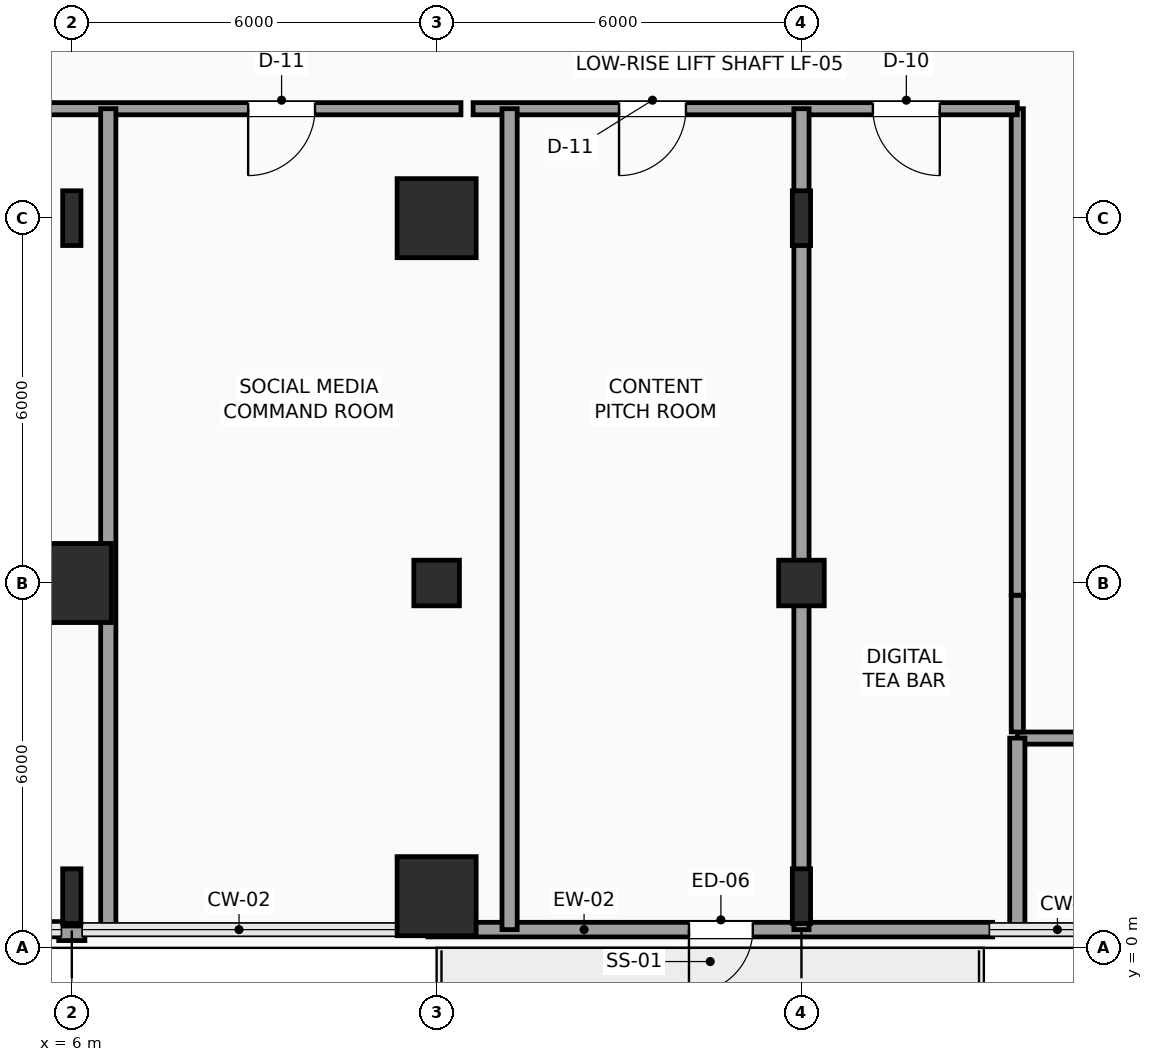
"""IFC4 building model, lengths in metres.
Left out: names, types, materials, properties, quantities, classifications, styles, units other than length and angle.
Written with IfcOpenShell. Run it as: python <this file> out.ifc"""

import sys

from ifc_helpers import new_model, si_unit, direction, frame, frame_2d, origin, origin_2d, place, context, subcontext, project, spatial, rectangle, hollow_rectangle, i_section, extrude, element, fill, save


model = new_model("IFC4")
c1 = context("Model", 3, precision=1e-05, world=origin(), true_north=direction((0.0, 1.0)))
c2 = subcontext(c1, "Body", "Model", "MODEL_VIEW")
j1 = project(units=[si_unit("LENGTHUNIT", "METRE"), si_unit("PLANEANGLEUNIT", "RADIAN")], contexts=[c1])
p1 = place(None, origin())
s1 = spatial("IfcSite", under=j1, at=p1, CompositionType="ELEMENT")
p2 = place(p1, origin())
s2 = spatial("IfcBuilding", under=s1, at=p2, CompositionType="ELEMENT")
p3 = place(p2, frame((0.0, 0.0, 79.2)))
s3 = spatial("IfcBuildingStorey", under=s2, at=p3, CompositionType="ELEMENT", Elevation=79.2)
p4 = place(p3, frame((6.0, 0.85, 0.0), z_axis=(0.0, 0.0, 1.0), x_axis=(1.0, 0.0, 0.0)))
e1 = element("IfcColumn", 1, at=p4, inside=s3, PredefinedType="COLUMN", context=c2, shape_type="SweptSolid", body=[
    extrude(i_section(OverallWidth=0.3, OverallDepth=0.9, WebThickness=0.019, FlangeThickness=0.035, FilletRadius=0.03, at=origin_2d()), origin(), (0.0, 0.0, 1.0), 3.9),
])
p5 = place(p3, frame((6.0, 6.0, 0.0), z_axis=(0.0, 0.0, 1.0), x_axis=(1.0, 0.0, 0.0)))
e2 = element("IfcColumn", 2, at=p5, inside=s3, PredefinedType="COLUMN", context=c2, shape_type="SweptSolid", body=[
    extrude(rectangle(XDim=1.3, YDim=1.3, at=origin_2d()), origin(), (0.0, 0.0, 1.0), 3.9),
])
p6 = place(p3, frame((6.0, 12.0, 0.0), z_axis=(0.0, 0.0, 1.0), x_axis=(1.0, 0.0, 0.0)))
e3 = element("IfcColumn", 3, at=p6, inside=s3, PredefinedType="COLUMN", context=c2, shape_type="SweptSolid", body=[
    extrude(i_section(OverallWidth=0.3, OverallDepth=0.9, WebThickness=0.019, FlangeThickness=0.035, FilletRadius=0.03, at=origin_2d()), origin(), (0.0, 0.0, 1.0), 3.9),
])
p7 = place(p3, frame((12.0, 0.85, 0.0), z_axis=(0.0, 0.0, 1.0), x_axis=(1.0, 0.0, 0.0)))
e4 = element("IfcColumn", 4, at=p7, inside=s3, PredefinedType="COLUMN", context=c2, shape_type="SweptSolid", body=[
    extrude(rectangle(XDim=1.3, YDim=1.3, at=origin_2d()), origin(), (0.0, 0.0, 1.0), 3.9),
])
p8 = place(p3, frame((12.0, 6.0, 0.0), z_axis=(0.0, 0.0, 1.0), x_axis=(1.0, 0.0, 0.0)))
e5 = element("IfcColumn", 5, at=p8, inside=s3, PredefinedType="COLUMN", context=c2, shape_type="SweptSolid", body=[
    extrude(hollow_rectangle(XDim=0.75, YDim=0.75, WallThickness=0.035, InnerFilletRadius=0.035, OuterFilletRadius=0.05, at=origin_2d()), origin(), (0.0, 0.0, 1.0), 3.9),
])
p9 = place(p3, frame((12.0, 12.0, 0.0), z_axis=(0.0, 0.0, 1.0), x_axis=(1.0, 0.0, 0.0)))
e6 = element("IfcColumn", 6, at=p9, inside=s3, PredefinedType="COLUMN", context=c2, shape_type="SweptSolid", body=[
    extrude(rectangle(XDim=1.3, YDim=1.3, at=origin_2d()), origin(), (0.0, 0.0, 1.0), 3.9),
])
p10 = place(p3, frame((18.0, 0.85, 0.0), z_axis=(0.0, 0.0, 1.0), x_axis=(1.0, 0.0, 0.0)))
e7 = element("IfcColumn", 7, at=p10, inside=s3, PredefinedType="COLUMN", context=c2, shape_type="SweptSolid", body=[
    extrude(i_section(OverallWidth=0.3, OverallDepth=0.9, WebThickness=0.019, FlangeThickness=0.035, FilletRadius=0.03, at=origin_2d()), origin(), (0.0, 0.0, 1.0), 3.9),
])
p11 = place(p3, frame((18.0, 6.0, 0.0), z_axis=(0.0, 0.0, 1.0), x_axis=(1.0, 0.0, 0.0)))
e8 = element("IfcColumn", 8, at=p11, inside=s3, PredefinedType="COLUMN", context=c2, shape_type="SweptSolid", body=[
    extrude(hollow_rectangle(XDim=0.75, YDim=0.75, WallThickness=0.035, InnerFilletRadius=0.035, OuterFilletRadius=0.05, at=origin_2d()), origin(), (0.0, 0.0, 1.0), 3.9),
])
p12 = place(p3, frame((18.0, 12.0, 0.0), z_axis=(0.0, 0.0, 1.0), x_axis=(1.0, 0.0, 0.0)))
e9 = element("IfcColumn", 9, at=p12, inside=s3, PredefinedType="COLUMN", context=c2, shape_type="SweptSolid", body=[
    extrude(i_section(OverallWidth=0.3, OverallDepth=0.9, WebThickness=0.019, FlangeThickness=0.035, FilletRadius=0.03, at=origin_2d()), origin(), (0.0, 0.0, 1.0), 3.9),
])
p13 = place(p3, frame((21.145, 0.3, 0.0), z_axis=(0.0, 0.0, 1.0), x_axis=(-1.0, 0.0, 0.0)))
e10 = element("IfcWall", 10, at=p13, inside=s3, PredefinedType="SOLIDWALL", context=c2, shape_type="SweptSolid", body=[
    extrude(rectangle(XDim=9.29, YDim=0.24, at=frame_2d((4.645, 0.0))), origin(), (0.0, 0.0, 1.0), 3.65),
])
p14 = place(p13, frame((3.945, 0.0, 0.0)))
e11 = element("IfcOpeningElement", 11, at=p14, cuts=e10, PredefinedType="OPENING", context=c2, shape_type="SweptSolid", body=[
    extrude(rectangle(XDim=1.05, YDim=2.2, at=frame_2d((0.525, 1.1))), frame((0.0, 0.13, 0.0), z_axis=(0.0, -1.0, 0.0), x_axis=(1.0, 0.0, 0.0)), (0.0, 0.0, 1.0), 0.26),
])
p15 = place(p3, frame((6.215, 0.24, 0.0), z_axis=(0.0, 0.0, 1.0), x_axis=(-1.0, 0.0, 0.0)))
e12 = element("IfcWall", 12, at=p15, inside=s3, PredefinedType="SOLIDWALL", context=c2, shape_type="SweptSolid", body=[
    extrude(rectangle(XDim=0.43, YDim=0.24, at=frame_2d((0.215, 0.0))), origin(), (0.0, 0.0, 1.0), 3.65),
])
p16 = place(p3, frame((36.15, 3.45, 0.0), z_axis=(0.0, 0.0, 1.0), x_axis=(-1.0, 0.0, 0.0)))
e13 = element("IfcWall", 13, at=p16, inside=s3, PredefinedType="PARTITIONING", context=c2, shape_type="SweptSolid", body=[
    extrude(rectangle(XDim=14.6, YDim=0.2, at=frame_2d((7.3, 0.0))), origin(), (0.0, 0.0, 1.0), 3.142),
])
p17 = place(p16, frame((11.275, 0.0, 0.0)))
e14 = element("IfcOpeningElement", 14, at=p17, cuts=e13, PredefinedType="OPENING", context=c2, shape_type="SweptSolid", body=[
    extrude(rectangle(XDim=1.1, YDim=2.25, at=frame_2d((0.55, 1.125))), frame((0.0, 0.11, 0.0), z_axis=(0.0, -1.0, 0.0), x_axis=(1.0, 0.0, 0.0)), (0.0, 0.0, 1.0), 0.22),
])
p18 = place(p16, frame((5.65, 0.0, 0.0)))
e15 = element("IfcOpeningElement", 15, at=p18, cuts=e13, PredefinedType="OPENING", context=c2, shape_type="SweptSolid", body=[
    extrude(rectangle(XDim=1.1, YDim=2.25, at=frame_2d((0.55, 1.125))), frame((0.0, 0.11, 0.0), z_axis=(0.0, -1.0, 0.0), x_axis=(1.0, 0.0, 0.0)), (0.0, 0.0, 1.0), 0.22),
])
p19 = place(p3, frame((21.55, 3.55, 0.0), z_axis=(0.0, 0.0, 1.0), x_axis=(0.0, 1.0, 0.0)))
e16 = element("IfcWall", 16, at=p19, inside=s3, PredefinedType="PARTITIONING", context=c2, shape_type="SweptSolid", body=[
    extrude(rectangle(XDim=2.25, YDim=0.2, at=frame_2d((1.125, 0.0))), origin(), (0.0, 0.0, 1.0), 3.65),
])
p20 = place(p3, frame((21.55, 5.8, 0.0), z_axis=(0.0, 0.0, 1.0), x_axis=(0.0, 1.0, 0.0)))
e17 = element("IfcWall", 17, at=p20, inside=s3, PredefinedType="PARTITIONING", context=c2, shape_type="SweptSolid", body=[
    extrude(rectangle(XDim=8.0, YDim=0.2, at=frame_2d((4.0, 0.0))), origin(), (0.0, 0.0, 1.0), 3.65),
])
p21 = place(p3, frame((21.55, 13.8, 0.0), z_axis=(0.0, 0.0, 1.0), x_axis=(-1.0, 0.0, 0.0)))
e18 = element("IfcWall", 18, at=p21, inside=s3, PredefinedType="PARTITIONING", context=c2, shape_type="SweptSolid", body=[
    extrude(rectangle(XDim=8.95, YDim=0.2, at=frame_2d((4.475, 0.0))), origin(), (0.0, 0.0, 1.0), 3.65),
])
p22 = place(p21, frame((5.45, 0.0, 0.0)))
e19 = element("IfcOpeningElement", 19, at=p22, cuts=e18, PredefinedType="OPENING", context=c2, shape_type="SweptSolid", body=[
    extrude(rectangle(XDim=1.1, YDim=2.25, at=frame_2d((0.55, 1.125))), frame((0.0, 0.11, 0.0), z_axis=(0.0, -1.0, 0.0), x_axis=(1.0, 0.0, 0.0)), (0.0, 0.0, 1.0), 0.22),
])
p23 = place(p21, frame((1.275, 0.0, 0.0)))
e20 = element("IfcOpeningElement", 20, at=p23, cuts=e18, PredefinedType="OPENING", context=c2, shape_type="SweptSolid", body=[
    extrude(rectangle(XDim=1.1, YDim=2.25, at=frame_2d((0.55, 1.125))), frame((0.0, 0.11, 0.0), z_axis=(0.0, -1.0, 0.0), x_axis=(1.0, 0.0, 0.0)), (0.0, 0.0, 1.0), 0.22),
])
p24 = place(p3, frame((12.4, 13.8, 0.0), z_axis=(0.0, 0.0, 1.0), x_axis=(-1.0, 0.0, 0.0)))
e21 = element("IfcWall", 21, at=p24, inside=s3, PredefinedType="PARTITIONING", context=c2, shape_type="SweptSolid", body=[
    extrude(rectangle(XDim=7.15, YDim=0.2, at=frame_2d((3.575, 0.0))), origin(), (0.0, 0.0, 1.0), 3.65),
])
p25 = place(p24, frame((2.4, 0.0, 0.0)))
e22 = element("IfcOpeningElement", 22, at=p25, cuts=e21, PredefinedType="OPENING", context=c2, shape_type="SweptSolid", body=[
    extrude(rectangle(XDim=1.1, YDim=2.25, at=frame_2d((0.55, 1.125))), frame((0.0, 0.11, 0.0), z_axis=(0.0, -1.0, 0.0), x_axis=(1.0, 0.0, 0.0)), (0.0, 0.0, 1.0), 0.22),
])
p26 = place(p3, frame((0.35, 0.35, 0.0), z_axis=(0.0, 0.0, 1.0), x_axis=(0.99996767298, -0.008040708569, 0.0)))
e23 = element("IfcWall", 23, at=p26, inside=s3, PredefinedType="PARTITIONING", context=c2, shape_type="SweptSolid", body=[
    extrude(rectangle(XDim=5.435, YDim=0.25, at=frame_2d((2.718, 0.0))), origin(), (0.0, 0.0, 1.0), 3.65),
])
for number, where, z_axis, x_axis in (
    (24, (6.6, 0.3, 0.0), (0.0, 0.0, 1.0), (0.0, 1.0, 0.0)),
    (25, (13.2, 0.3, 0.0), (0.0, 0.0, 1.0), (0.0, 1.0, 0.0)),
):
    element("IfcWall", number, at=place(p3, frame(where, z_axis=z_axis, x_axis=x_axis)), inside=s3, PredefinedType="PARTITIONING", context=c2, shape_type="SweptSolid", body=[
        extrude(rectangle(XDim=13.5, YDim=0.25, at=frame_2d((6.75, 0.0))), origin(), (0.0, 0.0, 1.0), 3.65),
    ])
p27 = place(p3, frame((18.0, 0.3, 0.0), z_axis=(0.0, 0.0, 1.0), x_axis=(0.0, 1.0, 0.0)))
e26 = element("IfcWall", 26, at=p27, inside=s3, PredefinedType="PARTITIONING", context=c2, shape_type="SweptSolid", body=[
    extrude(rectangle(XDim=13.5, YDim=0.25, at=frame_2d((6.75, 0.0))), origin(), (0.0, 0.0, 1.0), 2.992),
])
p28 = place(p3, frame((21.55, 0.3, 0.0), z_axis=(0.0, 0.0, 1.0), x_axis=(0.0, 1.0, 0.0)))
e27 = element("IfcWall", 27, at=p28, inside=s3, PredefinedType="PARTITIONING", context=c2, shape_type="SweptSolid", body=[
    extrude(rectangle(XDim=3.15, YDim=0.25, at=frame_2d((1.575, 0.0))), origin(), (0.0, 0.0, 1.0), 3.65),
])
p29 = place(p14, origin())
e28 = element("IfcDoor", 28, at=p29, inside=s3, OperationType="SINGLE_SWING_RIGHT", PredefinedType="DOOR", context=c2, shape_type="SweptSolid", body=[
    extrude(rectangle(XDim=1.05, YDim=2.2, at=frame_2d((0.525, 1.1))), frame((0.0, 0.025, 0.0), z_axis=(0.0, -1.0, 0.0), x_axis=(1.0, 0.0, 0.0)), (0.0, 0.0, 1.0), 0.05),
])
fill(e11, e28)
p30 = place(p22, origin())
e29 = element("IfcDoor", 29, at=p30, inside=s3, OperationType="SINGLE_SWING_RIGHT", PredefinedType="DOOR", context=c2, shape_type="SweptSolid", body=[
    extrude(rectangle(XDim=1.1, YDim=2.25, at=frame_2d((0.55, 1.125))), frame((0.0, 0.025, 0.0), z_axis=(0.0, -1.0, 0.0), x_axis=(1.0, 0.0, 0.0)), (0.0, 0.0, 1.0), 0.05),
])
fill(e19, e29)
p31 = place(p23, origin())
e30 = element("IfcDoor", 30, at=p31, inside=s3, OperationType="SINGLE_SWING_LEFT", PredefinedType="DOOR", context=c2, shape_type="SweptSolid", body=[
    extrude(rectangle(XDim=1.1, YDim=2.25, at=frame_2d((0.55, 1.125))), frame((0.0, 0.025, 0.0), z_axis=(0.0, -1.0, 0.0), x_axis=(1.0, 0.0, 0.0)), (0.0, 0.0, 1.0), 0.05),
])
fill(e20, e30)
p32 = place(p25, origin())
e31 = element("IfcDoor", 31, at=p32, inside=s3, OperationType="SINGLE_SWING_RIGHT", PredefinedType="DOOR", context=c2, shape_type="SweptSolid", body=[
    extrude(rectangle(XDim=1.1, YDim=2.25, at=frame_2d((0.55, 1.125))), frame((0.0, 0.025, 0.0), z_axis=(0.0, -1.0, 0.0), x_axis=(1.0, 0.0, 0.0)), (0.0, 0.0, 1.0), 0.05),
])
fill(e22, e31)
save(model, sys.argv[1])
